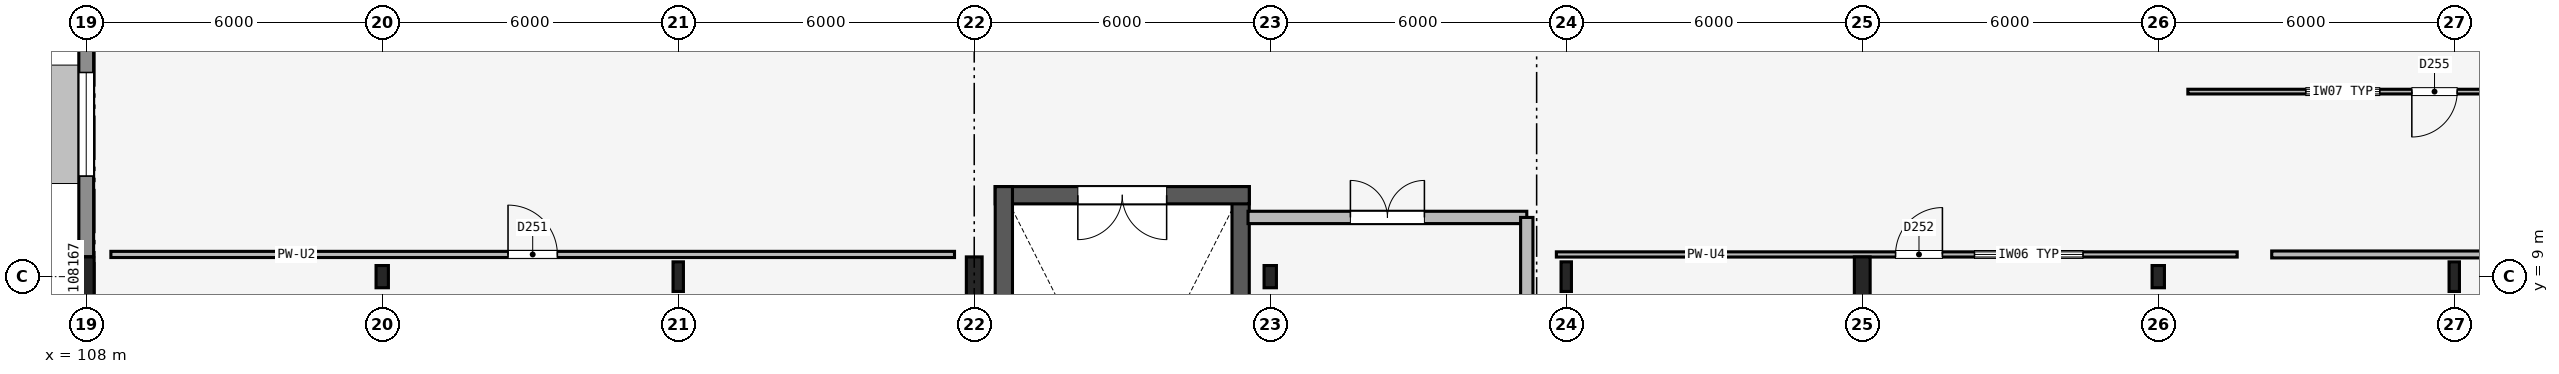
"""IFC4 building model, lengths in metres.
Left out: names, types, materials, properties, quantities, classifications, styles, units other than length and angle.
Written with IfcOpenShell. Run it as: python <this file> out.ifc"""

import sys

from ifc_helpers import new_model, si_unit, direction, frame, frame_2d, origin, origin_2d, place, context, subcontext, project, spatial, rectangle, i_section, extrude, element, fill, save


model = new_model("IFC4")
c1 = context("Model", 3, precision=1e-05, world=origin(), true_north=direction((0.0, 1.0)))
c2 = subcontext(c1, "Body", "Model", "MODEL_VIEW")
j1 = project(units=[si_unit("LENGTHUNIT", "METRE"), si_unit("PLANEANGLEUNIT", "RADIAN")], contexts=[c1])
p1 = place(None, origin())
s1 = spatial("IfcSite", under=j1, at=p1, CompositionType="ELEMENT")
p2 = place(p1, origin())
s2 = spatial("IfcBuilding", under=s1, at=p2, CompositionType="ELEMENT")
p3 = place(p2, frame((0.0, 0.0, 13.5)))
s3 = spatial("IfcBuildingStorey", under=s2, at=p3, CompositionType="ELEMENT", Elevation=13.5)
p4 = place(p3, frame((108.0, 9.0, 0.0), z_axis=(0.0, 0.0, 1.0), x_axis=(1.0, 0.0, 0.0)))
e1 = element("IfcColumn", 1, at=p4, inside=s3, PredefinedType="COLUMN", context=c2, shape_type="SweptSolid", body=[
    extrude(i_section(OverallWidth=0.32, OverallDepth=0.8, WebThickness=0.016, FlangeThickness=0.028, at=origin_2d()), origin(), (0.0, 0.0, 1.0), 4.5),
])
p5 = place(p3, frame((114.0, 9.0, 0.0), z_axis=(0.0, 0.0, 1.0), x_axis=(1.0, 0.0, 0.0)))
e2 = element("IfcColumn", 2, at=p5, inside=s3, PredefinedType="COLUMN", context=c2, shape_type="SweptSolid", body=[
    extrude(i_section(OverallWidth=0.25, OverallDepth=0.45, WebThickness=0.011, FlangeThickness=0.014, FilletRadius=0.015, at=origin_2d()), origin(), (0.0, 0.0, 1.0), 4.5),
])
p6 = place(p3, frame((120.0, 9.0, 0.0), z_axis=(0.0, 0.0, 1.0), x_axis=(1.0, 0.0, 0.0)))
e3 = element("IfcColumn", 3, at=p6, inside=s3, PredefinedType="COLUMN", context=c2, shape_type="SweptSolid", body=[
    extrude(i_section(OverallWidth=0.21, OverallDepth=0.6, WebThickness=0.012, FlangeThickness=0.021, FilletRadius=0.02, at=origin_2d()), origin(), (0.0, 0.0, 1.0), 4.5),
])
p7 = place(p3, frame((126.0, 9.0, 0.0), z_axis=(0.0, 0.0, 1.0), x_axis=(1.0, 0.0, 0.0)))
e4 = element("IfcColumn", 4, at=p7, inside=s3, PredefinedType="COLUMN", context=c2, shape_type="SweptSolid", body=[
    extrude(i_section(OverallWidth=0.32, OverallDepth=0.8, WebThickness=0.016, FlangeThickness=0.028, at=origin_2d()), origin(), (0.0, 0.0, 1.0), 4.5),
])
p8 = place(p3, frame((132.0, 9.0, 0.0), z_axis=(0.0, 0.0, 1.0), x_axis=(1.0, 0.0, 0.0)))
e5 = element("IfcColumn", 5, at=p8, inside=s3, PredefinedType="COLUMN", context=c2, shape_type="SweptSolid", body=[
    extrude(i_section(OverallWidth=0.25, OverallDepth=0.45, WebThickness=0.011, FlangeThickness=0.014, FilletRadius=0.015, at=origin_2d()), origin(), (0.0, 0.0, 1.0), 4.5),
])
p9 = place(p3, frame((138.0, 9.0, 0.0), z_axis=(0.0, 0.0, 1.0), x_axis=(1.0, 0.0, 0.0)))
e6 = element("IfcColumn", 6, at=p9, inside=s3, PredefinedType="COLUMN", context=c2, shape_type="SweptSolid", body=[
    extrude(i_section(OverallWidth=0.21, OverallDepth=0.6, WebThickness=0.012, FlangeThickness=0.021, FilletRadius=0.02, at=origin_2d()), origin(), (0.0, 0.0, 1.0), 4.5),
])
p10 = place(p3, frame((144.0, 9.0, 0.0), z_axis=(0.0, 0.0, 1.0), x_axis=(1.0, 0.0, 0.0)))
e7 = element("IfcColumn", 7, at=p10, inside=s3, PredefinedType="COLUMN", context=c2, shape_type="SweptSolid", body=[
    extrude(i_section(OverallWidth=0.32, OverallDepth=0.8, WebThickness=0.016, FlangeThickness=0.028, at=origin_2d()), origin(), (0.0, 0.0, 1.0), 4.5),
])
p11 = place(p3, frame((150.0, 9.0, 0.0), z_axis=(0.0, 0.0, 1.0), x_axis=(1.0, 0.0, 0.0)))
e8 = element("IfcColumn", 8, at=p11, inside=s3, PredefinedType="COLUMN", context=c2, shape_type="SweptSolid", body=[
    extrude(i_section(OverallWidth=0.25, OverallDepth=0.45, WebThickness=0.011, FlangeThickness=0.014, FilletRadius=0.015, at=origin_2d()), origin(), (0.0, 0.0, 1.0), 4.5),
])
p12 = place(p3, frame((156.0, 9.0, 0.0), z_axis=(0.0, 0.0, 1.0), x_axis=(1.0, 0.0, 0.0)))
e9 = element("IfcColumn", 9, at=p12, inside=s3, PredefinedType="COLUMN", context=c2, shape_type="SweptSolid", body=[
    extrude(i_section(OverallWidth=0.21, OverallDepth=0.6, WebThickness=0.012, FlangeThickness=0.021, FilletRadius=0.02, at=origin_2d()), origin(), (0.0, 0.0, 1.0), 4.5),
])
p13 = place(p3, frame((108.0, 9.404, 0.0), z_axis=(0.0, 0.0, 1.0), x_axis=(0.0, 1.0, 0.0)))
e10 = element("IfcWall", 10, at=p13, inside=s3, PredefinedType="SOLIDWALL", context=c2, shape_type="SweptSolid", body=[
    extrude(rectangle(XDim=5.367, YDim=0.3, at=frame_2d((2.684, 0.0))), origin(), (0.0, 0.0, 1.0), 3.69),
])
p14 = place(p13, frame((1.634, 0.0, 0.9)))
e11 = element("IfcOpeningElement", 11, at=p14, cuts=e10, PredefinedType="OPENING", context=c2, shape_type="SweptSolid", body=[
    extrude(rectangle(XDim=2.1, YDim=1.5, at=frame_2d((1.05, 0.75))), frame((0.0, 0.16, 0.0), z_axis=(0.0, -1.0, 0.0), x_axis=(1.0, 0.0, 0.0)), (0.0, 0.0, 1.0), 0.32),
])
p15 = place(p3, frame((131.4, 1.075, 0.0), z_axis=(0.0, 0.0, 1.0), x_axis=(0.0, 1.0, 0.0)))
e12 = element("IfcWall", 12, at=p15, inside=s3, PredefinedType="SHEAR", context=c2, shape_type="SweptSolid", body=[
    extrude(rectangle(XDim=9.75, YDim=0.35, at=frame_2d((4.875, 0.0))), origin(), (0.0, 0.0, 1.0), 4.36),
])
p16 = place(p3, frame((131.575, 10.65, 0.0), z_axis=(0.0, 0.0, 1.0), x_axis=(-1.0, 0.0, 0.0)))
e13 = element("IfcWall", 13, at=p16, inside=s3, PredefinedType="SHEAR", context=c2, shape_type="SweptSolid", body=[
    extrude(rectangle(XDim=5.15, YDim=0.35, at=frame_2d((2.575, 0.0))), origin(), (0.0, 0.0, 1.0), 4.36),
])
p17 = place(p16, frame((1.675, 0.0, 0.0)))
e14 = element("IfcOpeningElement", 14, at=p17, cuts=e13, PredefinedType="OPENING", context=c2, shape_type="SweptSolid", body=[
    extrude(rectangle(XDim=1.8, YDim=2.2, at=frame_2d((0.9, 1.1))), frame((0.0, 0.185, 0.0), z_axis=(0.0, -1.0, 0.0), x_axis=(1.0, 0.0, 0.0)), (0.0, 0.0, 1.0), 0.37),
])
p18 = place(p3, frame((126.6, 10.825, 0.0), z_axis=(0.0, 0.0, 1.0), x_axis=(0.0, -1.0, 0.0)))
e15 = element("IfcWall", 15, at=p18, inside=s3, PredefinedType="SHEAR", context=c2, shape_type="SweptSolid", body=[
    extrude(rectangle(XDim=9.75, YDim=0.35, at=frame_2d((4.875, 0.0))), origin(), (0.0, 0.0, 1.0), 4.36),
])
p19 = place(p3, frame((131.55, 10.2, 0.0), z_axis=(0.0, 0.0, 1.0), x_axis=(1.0, 0.0, 0.0)))
e16 = element("IfcWall", 16, at=p19, inside=s3, PredefinedType="PARTITIONING", context=c2, shape_type="SweptSolid", body=[
    extrude(rectangle(XDim=5.65, YDim=0.25, at=frame_2d((2.825, 0.0))), origin(), (0.0, 0.0, 1.0), 3.69),
])
p20 = place(p19, frame((2.075, 0.0, 0.0)))
e17 = element("IfcOpeningElement", 17, at=p20, cuts=e16, PredefinedType="OPENING", context=c2, shape_type="SweptSolid", body=[
    extrude(rectangle(XDim=1.5, YDim=2.15, at=frame_2d((0.75, 1.075))), frame((0.0, 0.135, 0.0), z_axis=(0.0, -1.0, 0.0), x_axis=(1.0, 0.0, 0.0)), (0.0, 0.0, 1.0), 0.27),
])
p21 = place(p3, frame((137.2, 5.8, 0.0), z_axis=(0.0, 0.0, 1.0), x_axis=(0.0, 1.0, 0.0)))
e18 = element("IfcWall", 18, at=p21, inside=s3, PredefinedType="PARTITIONING", context=c2, shape_type="SweptSolid", body=[
    extrude(rectangle(XDim=4.4, YDim=0.25, at=frame_2d((2.2, 0.0))), origin(), (0.0, 0.0, 1.0), 3.59),
])
p22 = place(p3, frame((108.5, 9.45, 0.0), z_axis=(0.0, 0.0, 1.0), x_axis=(1.0, 0.0, 0.0)))
e19 = element("IfcWall", 19, at=p22, inside=s3, PredefinedType="PARTITIONING", context=c2, shape_type="SweptSolid", body=[
    extrude(rectangle(XDim=17.1, YDim=0.125, at=frame_2d((8.55, 0.0))), origin(), (0.0, 0.0, 1.0), 3.69),
])
p23 = place(p22, frame((8.05, 0.0, 0.0)))
e20 = element("IfcOpeningElement", 20, at=p23, cuts=e19, PredefinedType="OPENING", context=c2, shape_type="SweptSolid", body=[
    extrude(rectangle(XDim=1.0, YDim=2.15, at=frame_2d((0.5, 1.075))), frame((0.0, 0.073, 0.0), z_axis=(0.0, -1.0, 0.0), x_axis=(1.0, 0.0, 0.0)), (0.0, 0.0, 1.0), 0.145),
])
p24 = place(p3, frame((137.8, 9.45, 0.0), z_axis=(0.0, 0.0, 1.0), x_axis=(1.0, 0.0, 0.0)))
e21 = element("IfcWall", 21, at=p24, inside=s3, PredefinedType="PARTITIONING", context=c2, shape_type="SweptSolid", body=[
    extrude(rectangle(XDim=13.8, YDim=0.105, at=frame_2d((6.9, 0.0))), origin(), (0.0, 0.0, 1.0), 3.69),
])
p25 = place(p24, frame((6.875, 0.0, 0.0)))
e22 = element("IfcOpeningElement", 22, at=p25, cuts=e21, PredefinedType="OPENING", context=c2, shape_type="SweptSolid", body=[
    extrude(rectangle(XDim=0.95, YDim=2.15, at=frame_2d((0.475, 1.075))), frame((0.0, 0.062, 0.0), z_axis=(0.0, -1.0, 0.0), x_axis=(1.0, 0.0, 0.0)), (0.0, 0.0, 1.0), 0.125),
])
p26 = place(p24, frame((8.475, 0.0, 0.9)))
e23 = element("IfcOpeningElement", 23, at=p26, cuts=e21, PredefinedType="OPENING", context=c2, shape_type="SweptSolid", body=[
    extrude(rectangle(XDim=2.2, YDim=1.4, at=frame_2d((1.1, 0.7))), frame((0.0, 0.062, 0.0), z_axis=(0.0, -1.0, 0.0), x_axis=(1.0, 0.0, 0.0)), (0.0, 0.0, 1.0), 0.125),
])
p27 = place(p3, frame((152.3, 9.45, 0.0), z_axis=(0.0, 0.0, 1.0), x_axis=(1.0, 0.0, 0.0)))
e24 = element("IfcWall", 24, at=p27, inside=s3, PredefinedType="PARTITIONING", context=c2, shape_type="SweptSolid", body=[
    extrude(rectangle(XDim=8.3, YDim=0.14, at=frame_2d((4.15, 0.0))), origin(), (0.0, 0.0, 1.0), 3.69),
])
p28 = place(p27, frame((4.275, 0.0, 0.0)))
e25 = element("IfcOpeningElement", 25, at=p28, cuts=e24, PredefinedType="OPENING", context=c2, shape_type="SweptSolid", body=[
    extrude(rectangle(XDim=1.55, YDim=2.2, at=frame_2d((0.775, 1.1))), frame((0.0, 0.08, 0.0), z_axis=(0.0, -1.0, 0.0), x_axis=(1.0, 0.0, 0.0)), (0.0, 0.0, 1.0), 0.16),
])
p29 = place(p3, frame((160.6, 12.75, 0.0), z_axis=(0.0, 0.0, 1.0), x_axis=(-1.0, 0.0, 0.0)))
e26 = element("IfcWall", 26, at=p29, inside=s3, PredefinedType="PARTITIONING", context=c2, shape_type="SweptSolid", body=[
    extrude(rectangle(XDim=10.0, YDim=0.095, at=frame_2d((5.0, 0.0))), origin(), (0.0, 0.0, 1.0), 3.69),
])
p30 = place(p29, frame((4.54, 0.0, 0.0)))
e27 = element("IfcOpeningElement", 27, at=p30, cuts=e26, PredefinedType="OPENING", context=c2, shape_type="SweptSolid", body=[
    extrude(rectangle(XDim=0.92, YDim=2.1, at=frame_2d((0.46, 1.05))), frame((0.0, 0.057, 0.0), z_axis=(0.0, -1.0, 0.0), x_axis=(1.0, 0.0, 0.0)), (0.0, 0.0, 1.0), 0.115),
])
p31 = place(p29, frame((6.11, 0.0, 1.0)))
e28 = element("IfcOpeningElement", 28, at=p31, cuts=e26, PredefinedType="OPENING", context=c2, shape_type="SweptSolid", body=[
    extrude(rectangle(XDim=1.5, YDim=1.2, at=frame_2d((0.75, 0.6))), frame((0.0, 0.057, 0.0), z_axis=(0.0, -1.0, 0.0), x_axis=(1.0, 0.0, 0.0)), (0.0, 0.0, 1.0), 0.115),
])
p32 = place(p14, origin())
e29 = element("IfcWindow", 29, at=p32, inside=s3, PartitioningType="SINGLE_PANEL", PredefinedType="WINDOW", context=c2, shape_type="SweptSolid", body=[
    extrude(rectangle(XDim=2.1, YDim=1.5, at=frame_2d((1.05, 0.75))), frame((0.0, 0.03, 0.0), z_axis=(0.0, -1.0, 0.0), x_axis=(1.0, 0.0, 0.0)), (0.0, 0.0, 1.0), 0.06),
])
fill(e11, e29)
p33 = place(p17, origin())
e30 = element("IfcDoor", 30, at=p33, inside=s3, OperationType="DOUBLE_DOOR_SINGLE_SWING", PredefinedType="DOOR", context=c2, shape_type="SweptSolid", body=[
    extrude(rectangle(XDim=1.8, YDim=2.2, at=frame_2d((0.9, 1.1))), frame((0.0, 0.025, 0.0), z_axis=(0.0, -1.0, 0.0), x_axis=(1.0, 0.0, 0.0)), (0.0, 0.0, 1.0), 0.05),
])
fill(e14, e30)
p34 = place(p20, origin())
e31 = element("IfcDoor", 31, at=p34, inside=s3, OperationType="DOUBLE_DOOR_SINGLE_SWING", PredefinedType="DOOR", context=c2, shape_type="SweptSolid", body=[
    extrude(rectangle(XDim=1.5, YDim=2.15, at=frame_2d((0.75, 1.075))), frame((0.0, 0.025, 0.0), z_axis=(0.0, -1.0, 0.0), x_axis=(1.0, 0.0, 0.0)), (0.0, 0.0, 1.0), 0.05),
])
fill(e17, e31)
p35 = place(p23, origin())
e32 = element("IfcDoor", 32, at=p35, inside=s3, OperationType="SINGLE_SWING_LEFT", PredefinedType="DOOR", context=c2, shape_type="SweptSolid", body=[
    extrude(rectangle(XDim=1.0, YDim=2.15, at=frame_2d((0.5, 1.075))), frame((0.0, 0.025, 0.0), z_axis=(0.0, -1.0, 0.0), x_axis=(1.0, 0.0, 0.0)), (0.0, 0.0, 1.0), 0.05),
])
fill(e20, e32)
p36 = place(p25, origin())
e33 = element("IfcDoor", 33, at=p36, inside=s3, OperationType="SINGLE_SWING_RIGHT", PredefinedType="DOOR", context=c2, shape_type="SweptSolid", body=[
    extrude(rectangle(XDim=0.95, YDim=2.15, at=frame_2d((0.475, 1.075))), frame((0.0, 0.025, 0.0), z_axis=(0.0, -1.0, 0.0), x_axis=(1.0, 0.0, 0.0)), (0.0, 0.0, 1.0), 0.05),
])
fill(e22, e33)
p37 = place(p26, origin())
e34 = element("IfcWindow", 34, at=p37, inside=s3, PartitioningType="SINGLE_PANEL", PredefinedType="WINDOW", context=c2, shape_type="SweptSolid", body=[
    extrude(rectangle(XDim=2.2, YDim=1.4, at=frame_2d((1.1, 0.7))), frame((0.0, 0.03, 0.0), z_axis=(0.0, -1.0, 0.0), x_axis=(1.0, 0.0, 0.0)), (0.0, 0.0, 1.0), 0.06),
])
fill(e23, e34)
p38 = place(p30, origin())
e35 = element("IfcDoor", 35, at=p38, inside=s3, OperationType="SINGLE_SWING_RIGHT", PredefinedType="DOOR", context=c2, shape_type="SweptSolid", body=[
    extrude(rectangle(XDim=0.92, YDim=2.1, at=frame_2d((0.46, 1.05))), frame((0.0, 0.025, 0.0), z_axis=(0.0, -1.0, 0.0), x_axis=(1.0, 0.0, 0.0)), (0.0, 0.0, 1.0), 0.05),
])
fill(e27, e35)
p39 = place(p31, origin())
e36 = element("IfcWindow", 36, at=p39, inside=s3, PartitioningType="SINGLE_PANEL", PredefinedType="WINDOW", context=c2, shape_type="SweptSolid", body=[
    extrude(rectangle(XDim=1.5, YDim=1.2, at=frame_2d((0.75, 0.6))), frame((0.0, 0.03, 0.0), z_axis=(0.0, -1.0, 0.0), x_axis=(1.0, 0.0, 0.0)), (0.0, 0.0, 1.0), 0.06),
])
fill(e28, e36)
save(model, sys.argv[1])
